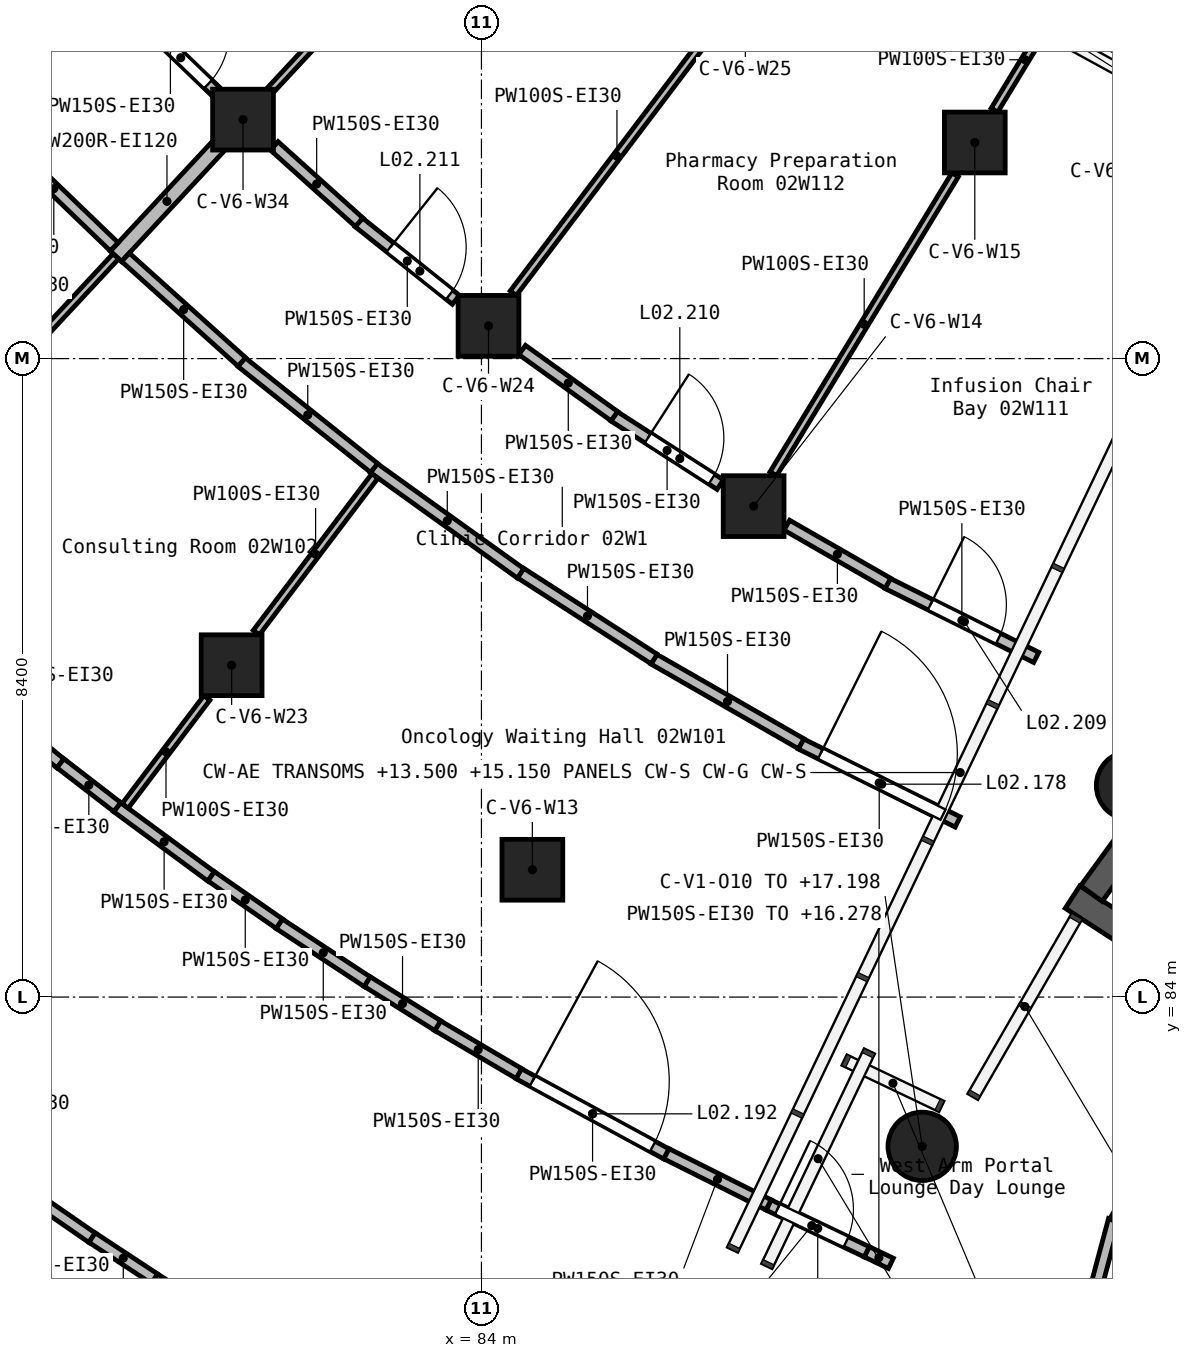
"""IFC4 building model, lengths in metres.
Left out: names, types, materials, properties, quantities, classifications, styles, units other than length and angle.
Written with IfcOpenShell. Run it as: python <this file> out.ifc"""

import sys

from ifc_helpers import new_model, si_unit, direction, frame, frame_2d, origin, origin_2d, place, context, subcontext, project, spatial, rectangle, circle, extrude, element, fill, save


model = new_model("IFC4")
c1 = context("Model", 3, precision=1e-05, world=origin(), true_north=direction((0.0, 1.0)))
c2 = subcontext(c1, "Body", "Model", "MODEL_VIEW")
j1 = project(units=[si_unit("LENGTHUNIT", "METRE"), si_unit("PLANEANGLEUNIT", "RADIAN")], contexts=[c1])
p1 = place(None, origin())
s1 = spatial("IfcSite", under=j1, at=p1, CompositionType="ELEMENT")
p2 = place(p1, origin())
s2 = spatial("IfcBuilding", under=s1, at=p2, CompositionType="ELEMENT")
p3 = place(p2, frame((0.0, 0.0, 12.6)))
s3 = spatial("IfcBuildingStorey", under=s2, at=p3, CompositionType="ELEMENT", Elevation=12.6)
for number, where, z_axis, x_axis in (
    (1, (80.713, 88.366, 0.0), (0.0, 0.0, 1.0), (1.0, 0.0, 0.0)),
    (2, (80.863, 95.544, 0.0), (0.0, 0.0, 1.0), (1.0, 0.0, 0.0)),
    (3, (84.093, 92.831, 0.0), (0.0, 0.0, 1.0), (1.0, 0.0, 0.0)),
    (4, (84.67, 85.675, 0.0), (0.0, 0.0, 1.0), (1.0, 0.0, 0.0)),
    (5, (87.581, 90.459, 0.0), (0.0, 0.0, 1.0), (1.0, 0.0, 0.0)),
):
    element("IfcColumn", number, at=place(p3, frame(where, z_axis=z_axis, x_axis=x_axis)), inside=s3, PredefinedType="COLUMN", context=c2, shape_type="SweptSolid", body=[
        extrude(rectangle(XDim=0.8, YDim=0.8, at=origin_2d()), origin(), (0.0, 0.0, 1.0), 4.2),
    ])
p4 = place(p3, frame((89.799, 82.036, 0.0), z_axis=(0.0, 0.0, 1.0), x_axis=(1.0, 0.0, 0.0)))
e6 = element("IfcColumn", 6, at=p4, inside=s3, PredefinedType="COLUMN", context=c2, shape_type="SweptSolid", body=[
    extrude(circle(Radius=0.45, at=origin_2d()), origin(), (0.0, 0.0, 1.0), 4.598),
])
p5 = place(p3, frame((90.491, 95.243, 0.0), z_axis=(0.0, 0.0, 1.0), x_axis=(1.0, 0.0, 0.0)))
e7 = element("IfcColumn", 7, at=p5, inside=s3, PredefinedType="COLUMN", context=c2, shape_type="SweptSolid", body=[
    extrude(rectangle(XDim=0.8, YDim=0.8, at=origin_2d()), origin(), (0.0, 0.0, 1.0), 4.2),
])
p6 = place(p3, frame((92.54, 86.784, 0.0), z_axis=(0.0, 0.0, 1.0), x_axis=(1.0, 0.0, 0.0)))
e8 = element("IfcColumn", 8, at=p6, inside=s3, PredefinedType="COLUMN", context=c2, shape_type="SweptSolid", body=[
    extrude(circle(Radius=0.45, at=origin_2d()), origin(), (0.0, 0.0, 1.0), 4.598),
])
p7 = place(p3, frame((91.776, 85.315, 0.0), z_axis=(0.0, 0.0, 1.0), x_axis=(0.838710342359, -0.544577782893, 0.0)))
e9 = element("IfcWall", 9, at=p7, inside=s3, PredefinedType="SHEAR", context=c2, shape_type="SweptSolid", body=[
    extrude(rectangle(XDim=3.951, YDim=0.35, at=frame_2d((1.976, 0.0))), origin(), (0.0, 0.0, 1.0), 4.2),
])
p8 = place(p3, frame((93.187, 86.958, 0.0), z_axis=(0.0, 0.0, 1.0), x_axis=(-0.588083467619, -0.808800244259, 0.0)))
e10 = element("IfcWall", 10, at=p8, inside=s3, PredefinedType="SHEAR", context=c2, shape_type="SweptSolid", body=[
    extrude(rectangle(XDim=1.974, YDim=0.35, at=frame_2d((0.987, 0.0))), origin(), (0.0, 0.0, 1.0), 4.2),
])
p9 = place(p3, frame((79.19, 93.746, 0.0), z_axis=(0.0, 0.0, 1.0), x_axis=(0.681171780306, 0.732123627344, 0.0)))
e11 = element("IfcWall", 11, at=p9, inside=s3, PredefinedType="SOLIDWALL", context=c2, shape_type="SweptSolid", body=[
    extrude(rectangle(XDim=1.974, YDim=0.2, at=frame_2d((0.987, 0.0))), origin(), (0.0, 0.0, 1.0), 3.85),
])
p10 = place(p3, frame((91.049, 76.312, 0.0), z_axis=(0.0, 0.0, 1.0), x_axis=(0.258927747961, 0.96589669289, 0.0)))
e12 = element("IfcWall", 12, at=p10, inside=s3, PredefinedType="PARTITIONING", context=c2, shape_type="SweptSolid", body=[
    extrude(rectangle(XDim=4.924, YDim=0.15, at=frame_2d((2.462, 0.0))), origin(), (0.0, 0.0, 1.0), 3.85),
])
p11 = place(p3, frame((92.333, 81.046, 0.0), z_axis=(0.0, 0.0, 1.0), x_axis=(0.499677038336, 0.866211785512, 0.0)))
e13 = element("IfcWall", 13, at=p11, inside=s3, PredefinedType="PARTITIONING", context=c2, shape_type="SweptSolid", body=[
    extrude(rectangle(XDim=3.103, YDim=0.15, at=frame_2d((1.551, 0.0))), origin(), (0.0, 0.0, 1.0), 3.85),
])
p12 = place(p3, frame((88.201, 87.331, 0.0), z_axis=(0.0, 0.0, 1.0), x_axis=(0.895335597875, -0.445392149883, 0.0)))
e14 = element("IfcWall", 14, at=p12, inside=s3, PredefinedType="PARTITIONING", context=c2, shape_type="SweptSolid", body=[
    extrude(rectangle(XDim=2.307, YDim=0.15, at=frame_2d((1.153, 0.0))), origin(), (0.0, 0.0, 1.0), 3.85),
])
p13 = place(p12, frame((0.291, 0.0, 0.0)))
e15 = element("IfcOpeningElement", 15, at=p13, cuts=e14, PredefinedType="OPENING", context=c2, shape_type="SweptSolid", body=[
    extrude(rectangle(XDim=1.8, YDim=2.1, at=frame_2d((0.9, 1.05))), frame((0.0, 0.085, 0.0), z_axis=(0.0, -1.0, 0.0), x_axis=(1.0, 0.0, 0.0)), (0.0, 0.0, 1.0), 0.17),
])
p14 = place(p3, frame((82.583, 90.961, 0.0), z_axis=(0.0, 0.0, 1.0), x_axis=(0.812456963848, -0.583021167622, 0.0)))
e16 = element("IfcWall", 16, at=p14, inside=s3, PredefinedType="PARTITIONING", context=c2, shape_type="SweptSolid", body=[
    extrude(rectangle(XDim=2.381, YDim=0.15, at=frame_2d((1.191, 0.0))), origin(), (0.0, 0.0, 1.0), 3.85),
])
p15 = place(p3, frame((80.841, 92.356, 0.0), z_axis=(0.0, 0.0, 1.0), x_axis=(0.781561025488, -0.62382879337, 0.0)))
e17 = element("IfcWall", 17, at=p15, inside=s3, PredefinedType="PARTITIONING", context=c2, shape_type="SweptSolid", body=[
    extrude(rectangle(XDim=2.235, YDim=0.15, at=frame_2d((1.118, 0.0))), origin(), (0.0, 0.0, 1.0), 3.85),
])
p16 = place(p3, frame((77.579, 95.4, 0.0), z_axis=(0.0, 0.0, 1.0), x_axis=(0.720594722174, -0.693356507415, 0.0)))
e18 = element("IfcWall", 18, at=p16, inside=s3, PredefinedType="PARTITIONING", context=c2, shape_type="SweptSolid", body=[
    extrude(rectangle(XDim=2.205, YDim=0.15, at=frame_2d((1.103, 0.0))), origin(), (0.0, 0.0, 1.0), 3.85),
])
p17 = place(p3, frame((86.268, 88.446, 0.0), z_axis=(0.0, 0.0, 1.0), x_axis=(0.867212921502, -0.497937494852, 0.0)))
e19 = element("IfcWall", 19, at=p17, inside=s3, PredefinedType="PARTITIONING", context=c2, shape_type="SweptSolid", body=[
    extrude(rectangle(XDim=2.235, YDim=0.15, at=frame_2d((1.118, 0.0))), origin(), (0.0, 0.0, 1.0), 3.85),
])
p18 = place(p3, frame((79.316, 93.733, 0.0), z_axis=(0.0, 0.0, 1.0), x_axis=(0.74346507851, -0.668774758073, 0.0)))
e20 = element("IfcWall", 20, at=p18, inside=s3, PredefinedType="PARTITIONING", context=c2, shape_type="SweptSolid", body=[
    extrude(rectangle(XDim=2.059, YDim=0.15, at=frame_2d((1.03, 0.0))), origin(), (0.0, 0.0, 1.0), 3.85),
])
p19 = place(p3, frame((84.517, 89.577, 0.0), z_axis=(0.0, 0.0, 1.0), x_axis=(0.840935250807, -0.541135753717, 0.0)))
e21 = element("IfcWall", 21, at=p19, inside=s3, PredefinedType="PARTITIONING", context=c2, shape_type="SweptSolid", body=[
    extrude(rectangle(XDim=2.088, YDim=0.15, at=frame_2d((1.044, 0.0))), origin(), (0.0, 0.0, 1.0), 3.85),
])
p20 = place(p3, frame((82.385, 94.194, 0.0), z_axis=(0.0, 0.0, 1.0), x_axis=(0.781756052881, -0.623584375833, 0.0)))
e22 = element("IfcWall", 22, at=p20, inside=s3, PredefinedType="PARTITIONING", context=c2, shape_type="SweptSolid", body=[
    extrude(rectangle(XDim=1.636, YDim=0.15, at=frame_2d((0.818, 0.0))), origin(), (0.0, 0.0, 1.0), 3.85),
])
p21 = place(p20, frame((0.53, 0.0, 0.0)))
e23 = element("IfcOpeningElement", 23, at=p21, cuts=e22, PredefinedType="OPENING", context=c2, shape_type="SweptSolid", body=[
    extrude(rectangle(XDim=1.0, YDim=2.1, at=frame_2d((0.5, 1.05))), frame((0.0, 0.085, 0.0), z_axis=(0.0, -1.0, 0.0), x_axis=(1.0, 0.0, 0.0)), (0.0, 0.0, 1.0), 0.17),
])
p22 = place(p3, frame((89.343, 89.442, 0.0), z_axis=(0.0, 0.0, 1.0), x_axis=(0.895274815557, -0.445514314731, 0.0)))
e24 = element("IfcWall", 24, at=p22, inside=s3, PredefinedType="PARTITIONING", context=c2, shape_type="SweptSolid", body=[
    extrude(rectangle(XDim=2.185, YDim=0.15, at=frame_2d((1.092, 0.0))), origin(), (0.0, 0.0, 1.0), 3.85),
])
p23 = place(p22, frame((0.63, 0.0, 0.0)))
e25 = element("IfcOpeningElement", 25, at=p23, cuts=e24, PredefinedType="OPENING", context=c2, shape_type="SweptSolid", body=[
    extrude(rectangle(XDim=1.0, YDim=2.1, at=frame_2d((0.5, 1.05))), frame((0.0, 0.085, 0.0), z_axis=(0.0, -1.0, 0.0), x_axis=(1.0, 0.0, 0.0)), (0.0, 0.0, 1.0), 0.17),
])
p24 = place(p3, frame((85.744, 91.642, 0.0), z_axis=(0.0, 0.0, 1.0), x_axis=(0.840848932624, -0.54126987031, 0.0)))
e26 = element("IfcWall", 26, at=p24, inside=s3, PredefinedType="PARTITIONING", context=c2, shape_type="SweptSolid", body=[
    extrude(rectangle(XDim=1.662, YDim=0.15, at=frame_2d((0.831, 0.0))), origin(), (0.0, 0.0, 1.0), 3.85),
])
p25 = place(p24, frame((0.53, 0.0, 0.0)))
e27 = element("IfcOpeningElement", 27, at=p25, cuts=e26, PredefinedType="OPENING", context=c2, shape_type="SweptSolid", body=[
    extrude(rectangle(XDim=1.0, YDim=2.1, at=frame_2d((0.5, 1.05))), frame((0.0, 0.085, 0.0), z_axis=(0.0, -1.0, 0.0), x_axis=(1.0, 0.0, 0.0)), (0.0, 0.0, 1.0), 0.17),
])
p26 = place(p3, frame((79.301, 97.072, 0.0), z_axis=(0.0, 0.0, 1.0), x_axis=(0.720465115712, -0.69349118022, 0.0)))
e28 = element("IfcWall", 28, at=p26, inside=s3, PredefinedType="PARTITIONING", context=c2, shape_type="SweptSolid", body=[
    extrude(rectangle(XDim=1.684, YDim=0.15, at=frame_2d((0.842, 0.0))), origin(), (0.0, 0.0, 1.0), 3.85),
])
p27 = place(p26, frame((0.53, 0.0, 0.0)))
e29 = element("IfcOpeningElement", 29, at=p27, cuts=e28, PredefinedType="OPENING", context=c2, shape_type="SweptSolid", body=[
    extrude(rectangle(XDim=1.0, YDim=2.1, at=frame_2d((0.5, 1.05))), frame((0.0, 0.085, 0.0), z_axis=(0.0, -1.0, 0.0), x_axis=(1.0, 0.0, 0.0)), (0.0, 0.0, 1.0), 0.17),
])
p28 = place(p3, frame((84.536, 92.513, 0.0), z_axis=(0.0, 0.0, 1.0), x_axis=(0.81243891359, -0.583046320359, 0.0)))
e30 = element("IfcWall", 30, at=p28, inside=s3, PredefinedType="PARTITIONING", context=c2, shape_type="SweptSolid", body=[
    extrude(rectangle(XDim=1.493, YDim=0.15, at=frame_2d((0.747, 0.0))), origin(), (0.0, 0.0, 1.0), 3.85),
])
p29 = place(p3, frame((88.018, 90.208, 0.0), z_axis=(0.0, 0.0, 1.0), x_axis=(0.867174234795, -0.498004865947, 0.0)))
e31 = element("IfcWall", 31, at=p29, inside=s3, PredefinedType="PARTITIONING", context=c2, shape_type="SweptSolid", body=[
    extrude(rectangle(XDim=1.535, YDim=0.15, at=frame_2d((0.768, 0.0))), origin(), (0.0, 0.0, 1.0), 3.85),
])
p30 = place(p3, frame((81.273, 95.199, 0.0), z_axis=(0.0, 0.0, 1.0), x_axis=(0.743576936712, -0.668650386368, 0.0)))
e32 = element("IfcWall", 32, at=p30, inside=s3, PredefinedType="PARTITIONING", context=c2, shape_type="SweptSolid", body=[
    extrude(rectangle(XDim=1.502, YDim=0.15, at=frame_2d((0.751, 0.0))), origin(), (0.0, 0.0, 1.0), 3.85),
])
p31 = place(p3, frame((84.489, 82.993, 0.0), z_axis=(0.0, 0.0, 1.0), x_axis=(0.878602388498, -0.47755402095, 0.0)))
e33 = element("IfcWall", 33, at=p31, inside=s3, PredefinedType="PARTITIONING", context=c2, shape_type="SweptSolid", body=[
    extrude(rectangle(XDim=2.215, YDim=0.15, at=frame_2d((1.107, 0.0))), origin(), (0.0, 0.0, 1.0), 3.85),
])
p32 = place(p31, frame((0.207, 0.0, 0.0)))
e34 = element("IfcOpeningElement", 34, at=p32, cuts=e33, PredefinedType="OPENING", context=c2, shape_type="SweptSolid", body=[
    extrude(rectangle(XDim=1.8, YDim=2.1, at=frame_2d((0.9, 1.05))), frame((0.0, 0.085, 0.0), z_axis=(0.0, -1.0, 0.0), x_axis=(1.0, 0.0, 0.0)), (0.0, 0.0, 1.0), 0.17),
])
p33 = place(p3, frame((77.051, 88.236, 0.0), z_axis=(0.0, 0.0, 1.0), x_axis=(0.771517511576, -0.636208086502, 0.0)))
e35 = element("IfcWall", 35, at=p33, inside=s3, PredefinedType="PARTITIONING", context=c2, shape_type="SweptSolid", body=[
    extrude(rectangle(XDim=1.828, YDim=0.15, at=frame_2d((0.914, 0.0))), origin(), (0.0, 0.0, 1.0), 3.85),
])
p34 = place(p3, frame((87.778, 81.264, 0.0), z_axis=(0.0, 0.0, 1.0), x_axis=(0.902557824877, -0.430568662066, 0.0)))
e36 = element("IfcWall", 36, at=p34, inside=s3, PredefinedType="PARTITIONING", context=c2, shape_type="SweptSolid", body=[
    extrude(rectangle(XDim=1.432, YDim=0.15, at=frame_2d((0.716, 0.0))), origin(), (0.0, 0.0, 1.0), 3.85),
])
p35 = place(p34, frame((0.129, 0.0, 0.0)))
e37 = element("IfcOpeningElement", 37, at=p35, cuts=e36, PredefinedType="OPENING", context=c2, shape_type="SweptSolid", body=[
    extrude(rectangle(XDim=1.0, YDim=2.1, at=frame_2d((0.5, 1.05))), frame((0.0, 0.085, 0.0), z_axis=(0.0, -1.0, 0.0), x_axis=(1.0, 0.0, 0.0)), (0.0, 0.0, 1.0), 0.17),
])
p36 = place(p3, frame((89.071, 80.648, 0.0), z_axis=(0.0, 0.0, 1.0), x_axis=(0.902641205527, -0.43039383602, 0.0)))
e38 = element("IfcWall", 38, at=p36, inside=s3, PredefinedType="PARTITIONING", context=c2, shape_type="SweptSolid", body=[
    extrude(rectangle(XDim=0.35, YDim=0.15, at=frame_2d((0.175, 0.0))), origin(), (0.0, 0.0, 1.0), 3.678),
])
p37 = place(p3, frame((86.434, 81.938, 0.0), z_axis=(0.0, 0.0, 1.0), x_axis=(0.894297168166, -0.447473546717, 0.0)))
e39 = element("IfcWall", 39, at=p37, inside=s3, PredefinedType="PARTITIONING", context=c2, shape_type="SweptSolid", body=[
    extrude(rectangle(XDim=1.503, YDim=0.15, at=frame_2d((0.751, 0.0))), origin(), (0.0, 0.0, 1.0), 3.85),
])
p38 = place(p3, frame((79.206, 86.5, 0.0), z_axis=(0.0, 0.0, 1.0), x_axis=(0.804960127747, -0.593328907721, 0.0)))
e40 = element("IfcWall", 40, at=p38, inside=s3, PredefinedType="PARTITIONING", context=c2, shape_type="SweptSolid", body=[
    extrude(rectangle(XDim=1.539, YDim=0.15, at=frame_2d((0.77, 0.0))), origin(), (0.0, 0.0, 1.0), 3.85),
])
p39 = place(p3, frame((79.695, 80.295, 0.0), z_axis=(0.0, 0.0, 1.0), x_axis=(0.847541618724, -0.530728936964, 0.0)))
e41 = element("IfcWall", 41, at=p39, inside=s3, PredefinedType="PARTITIONING", context=c2, shape_type="SweptSolid", body=[
    extrude(rectangle(XDim=1.353, YDim=0.15, at=frame_2d((0.676, 0.0))), origin(), (0.0, 0.0, 1.0), 3.85),
])
p40 = place(p3, frame((77.653, 81.68, 0.0), z_axis=(0.0, 0.0, 1.0), x_axis=(0.822646640465, -0.568552992194, 0.0)))
e42 = element("IfcWall", 42, at=p40, inside=s3, PredefinedType="PARTITIONING", context=c2, shape_type="SweptSolid", body=[
    extrude(rectangle(XDim=1.488, YDim=0.15, at=frame_2d((0.744, 0.0))), origin(), (0.0, 0.0, 1.0), 3.85),
])
p41 = place(p3, frame((81.338, 84.965, 0.0), z_axis=(0.0, 0.0, 1.0), x_axis=(0.834958204617, -0.550313362134, 0.0)))
e43 = element("IfcWall", 43, at=p41, inside=s3, PredefinedType="PARTITIONING", context=c2, shape_type="SweptSolid", body=[
    extrude(rectangle(XDim=1.389, YDim=0.15, at=frame_2d((0.695, 0.0))), origin(), (0.0, 0.0, 1.0), 3.85),
])
p42 = place(p3, frame((83.422, 83.624, 0.0), z_axis=(0.0, 0.0, 1.0), x_axis=(0.861696583626, -0.507423883718, 0.0)))
e44 = element("IfcWall", 44, at=p42, inside=s3, PredefinedType="PARTITIONING", context=c2, shape_type="SweptSolid", body=[
    extrude(rectangle(XDim=1.242, YDim=0.15, at=frame_2d((0.621, 0.0))), origin(), (0.0, 0.0, 1.0), 3.85),
])
for number, where, z_axis, x_axis in (
    (45, (82.498, 84.203, 0.0), (0.0, 0.0, 1.0), (0.848, -0.529, 0.0)),
    (46, (80.444, 85.589, 0.0), (0.0, 0.0, 1.0), (0.821, -0.571, 0.0)),
):
    element("IfcWall", number, at=place(p3, frame(where, z_axis=z_axis, x_axis=x_axis)), inside=s3, PredefinedType="PARTITIONING", context=c2, shape_type="SweptSolid", body=[
        extrude(rectangle(XDim=1.093, YDim=0.15, at=frame_2d((0.546, 0.0))), origin(), (0.0, 0.0, 1.0), 3.85),
    ])
p43 = place(p3, frame((78.877, 80.836, 0.0), z_axis=(0.0, 0.0, 1.0), x_axis=(0.835209839134, -0.549931381733, 0.0)))
e47 = element("IfcWall", 47, at=p43, inside=s3, PredefinedType="PARTITIONING", context=c2, shape_type="SweptSolid", body=[
    extrude(rectangle(XDim=0.982, YDim=0.15, at=frame_2d((0.491, 0.0))), origin(), (0.0, 0.0, 1.0), 3.85),
])
p44 = place(p3, frame((78.46, 87.077, 0.0), z_axis=(0.0, 0.0, 1.0), x_axis=(0.791671493317, -0.610947008069, 0.0)))
e48 = element("IfcWall", 48, at=p44, inside=s3, PredefinedType="PARTITIONING", context=c2, shape_type="SweptSolid", body=[
    extrude(rectangle(XDim=0.944, YDim=0.15, at=frame_2d((0.472, 0.0))), origin(), (0.0, 0.0, 1.0), 3.85),
])
p45 = place(p3, frame((84.418, 93.26, 0.0), z_axis=(0.0, 0.0, 1.0), x_axis=(0.603501117064, 0.797362152163, 0.0)))
e49 = element("IfcWall", 49, at=p45, inside=s3, PredefinedType="PARTITIONING", context=c2, shape_type="SweptSolid", body=[
    extrude(rectangle(XDim=4.522, YDim=0.1, at=frame_2d((2.261, 0.0))), origin(), (0.0, 0.0, 1.0), 3.85),
])
p46 = place(p3, frame((87.84, 90.885, 0.0), z_axis=(0.0, 0.0, 1.0), x_axis=(0.519618801015, 0.854398210223, 0.0)))
e50 = element("IfcWall", 50, at=p46, inside=s3, PredefinedType="PARTITIONING", context=c2, shape_type="SweptSolid", body=[
    extrude(rectangle(XDim=4.603, YDim=0.1, at=frame_2d((2.302, 0.0))), origin(), (0.0, 0.0, 1.0), 3.85),
])
p47 = place(p3, frame((90.75, 95.668, 0.0), z_axis=(0.0, 0.0, 1.0), x_axis=(0.519552672181, 0.854438424247, 0.0)))
e51 = element("IfcWall", 51, at=p47, inside=s3, PredefinedType="PARTITIONING", context=c2, shape_type="SweptSolid", body=[
    extrude(rectangle(XDim=1.552, YDim=0.1, at=frame_2d((0.776, 0.0))), origin(), (0.0, 0.0, 1.0), 3.85),
])
p48 = place(p3, frame((81.227, 95.935, 0.0), z_axis=(0.0, 0.0, 1.0), x_axis=(0.681211440492, 0.732086725288, 0.0)))
e52 = element("IfcWall", 52, at=p48, inside=s3, PredefinedType="PARTITIONING", context=c2, shape_type="SweptSolid", body=[
    extrude(rectangle(XDim=4.53, YDim=0.1, at=frame_2d((2.265, 0.0))), origin(), (0.0, 0.0, 1.0), 3.85),
])
p49 = place(p3, frame((77.412, 91.835, 0.0), z_axis=(0.0, 0.0, 1.0), x_axis=(0.681147107729, 0.732146582067, 0.0)))
e53 = element("IfcWall", 53, at=p49, inside=s3, PredefinedType="PARTITIONING", context=c2, shape_type="SweptSolid", body=[
    extrude(rectangle(XDim=2.609, YDim=0.1, at=frame_2d((1.304, 0.0))), origin(), (0.0, 0.0, 1.0), 3.85),
])
p50 = place(p3, frame((79.312, 86.515, 0.0), z_axis=(0.0, 0.0, 1.0), x_axis=(0.603588624137, 0.797295912954, 0.0)))
e54 = element("IfcWall", 54, at=p50, inside=s3, PredefinedType="PARTITIONING", context=c2, shape_type="SweptSolid", body=[
    extrude(rectangle(XDim=1.782, YDim=0.1, at=frame_2d((0.891, 0.0))), origin(), (0.0, 0.0, 1.0), 3.85),
])
p51 = place(p3, frame((81.038, 88.796, 0.0), z_axis=(0.0, 0.0, 1.0), x_axis=(0.603561177332, 0.797316690668, 0.0)))
e55 = element("IfcWall", 55, at=p51, inside=s3, PredefinedType="PARTITIONING", context=c2, shape_type="SweptSolid", body=[
    extrude(rectangle(XDim=2.584, YDim=0.1, at=frame_2d((1.292, 0.0))), origin(), (0.0, 0.0, 1.0), 3.85),
])
p52 = place(p3, frame((91.572, 96.928, 0.0), z_axis=(0.0, 0.0, 1.0), x_axis=(0.867607434085, -0.497249776591, 0.0)))
e56 = element("IfcWall", 56, at=p52, inside=s3, PredefinedType="PARTITIONING", context=c2, shape_type="SweptSolid", body=[
    extrude(rectangle(XDim=1.751, YDim=0.1, at=frame_2d((0.875, 0.0))), origin(), (0.0, 0.0, 1.0), 3.85),
])
p53 = place(p13, origin())
e57 = element("IfcDoor", 57, at=p53, inside=s3, OperationType="DOUBLE_DOOR_SINGLE_SWING", PredefinedType="DOOR", context=c2, shape_type="SweptSolid", body=[
    extrude(rectangle(XDim=1.8, YDim=2.1, at=frame_2d((0.9, 1.05))), frame((0.0, 0.025, 0.0), z_axis=(0.0, -1.0, 0.0), x_axis=(1.0, 0.0, 0.0)), (0.0, 0.0, 1.0), 0.05),
])
fill(e15, e57)
p54 = place(p32, frame((1.8, 0.0, 0.0), z_axis=(0.0, 0.0, 1.0), x_axis=(-1.0, 0.0, 0.0)))
e58 = element("IfcDoor", 58, at=p54, inside=s3, OperationType="DOUBLE_DOOR_SINGLE_SWING", PredefinedType="DOOR", context=c2, shape_type="SweptSolid", body=[
    extrude(rectangle(XDim=1.8, YDim=2.1, at=frame_2d((0.9, 1.05))), frame((0.0, 0.025, 0.0), z_axis=(0.0, -1.0, 0.0), x_axis=(1.0, 0.0, 0.0)), (0.0, 0.0, 1.0), 0.05),
])
fill(e34, e58)
p55 = place(p23, origin())
e59 = element("IfcDoor", 59, at=p55, inside=s3, OperationType="SINGLE_SWING_RIGHT", PredefinedType="DOOR", context=c2, shape_type="SweptSolid", body=[
    extrude(rectangle(XDim=1.0, YDim=2.1, at=frame_2d((0.5, 1.05))), frame((0.0, 0.025, 0.0), z_axis=(0.0, -1.0, 0.0), x_axis=(1.0, 0.0, 0.0)), (0.0, 0.0, 1.0), 0.05),
])
fill(e25, e59)
p56 = place(p25, origin())
e60 = element("IfcDoor", 60, at=p56, inside=s3, OperationType="SINGLE_SWING_RIGHT", PredefinedType="DOOR", context=c2, shape_type="SweptSolid", body=[
    extrude(rectangle(XDim=1.0, YDim=2.1, at=frame_2d((0.5, 1.05))), frame((0.0, 0.025, 0.0), z_axis=(0.0, -1.0, 0.0), x_axis=(1.0, 0.0, 0.0)), (0.0, 0.0, 1.0), 0.05),
])
fill(e27, e60)
p57 = place(p21, origin())
e61 = element("IfcDoor", 61, at=p57, inside=s3, OperationType="SINGLE_SWING_RIGHT", PredefinedType="DOOR", context=c2, shape_type="SweptSolid", body=[
    extrude(rectangle(XDim=1.0, YDim=2.1, at=frame_2d((0.5, 1.05))), frame((0.0, 0.025, 0.0), z_axis=(0.0, -1.0, 0.0), x_axis=(1.0, 0.0, 0.0)), (0.0, 0.0, 1.0), 0.05),
])
fill(e23, e61)
p58 = place(p27, origin())
e62 = element("IfcDoor", 62, at=p58, inside=s3, OperationType="SINGLE_SWING_RIGHT", PredefinedType="DOOR", context=c2, shape_type="SweptSolid", body=[
    extrude(rectangle(XDim=1.0, YDim=2.1, at=frame_2d((0.5, 1.05))), frame((0.0, 0.025, 0.0), z_axis=(0.0, -1.0, 0.0), x_axis=(1.0, 0.0, 0.0)), (0.0, 0.0, 1.0), 0.05),
])
fill(e29, e62)
p59 = place(p35, origin())
e63 = element("IfcDoor", 63, at=p59, inside=s3, OperationType="SINGLE_SWING_LEFT", PredefinedType="DOOR", context=c2, shape_type="SweptSolid", body=[
    extrude(rectangle(XDim=1.0, YDim=2.1, at=frame_2d((0.5, 1.05))), frame((0.0, 0.025, 0.0), z_axis=(0.0, -1.0, 0.0), x_axis=(1.0, 0.0, 0.0)), (0.0, 0.0, 1.0), 0.05),
])
fill(e37, e63)
save(model, sys.argv[1])
